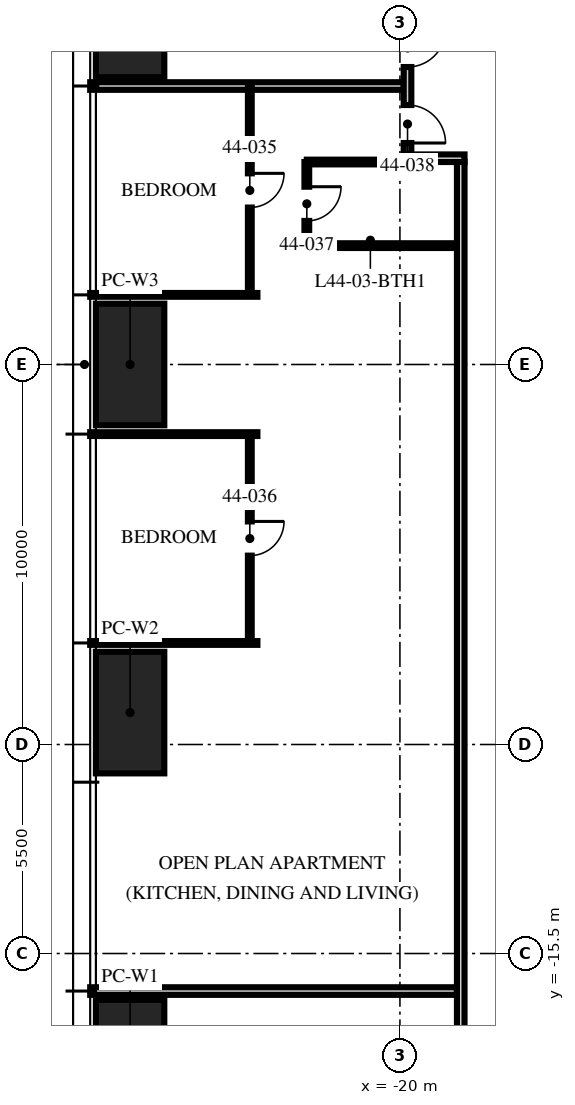
"""IFC4 building model, lengths in metres.
Left out: names, types, materials, properties, quantities, classifications, styles, units other than length and angle.
Written with IfcOpenShell. Run it as: python <this file> out.ifc"""

import sys

from ifc_helpers import new_model, si_unit, direction, frame, frame_2d, origin, origin_2d, place, context, subcontext, project, spatial, rectangle, hollow_rectangle, extrude, element, fill, save


model = new_model("IFC4")
c1 = context("Model", 3, precision=1e-05, world=origin(), true_north=direction((0.0, 1.0)))
c2 = subcontext(c1, "Body", "Model", "MODEL_VIEW")
j1 = project(units=[si_unit("LENGTHUNIT", "METRE"), si_unit("PLANEANGLEUNIT", "RADIAN")], contexts=[c1])
p1 = place(None, origin())
s1 = spatial("IfcSite", under=j1, at=p1, CompositionType="ELEMENT")
p2 = place(p1, origin())
s2 = spatial("IfcBuilding", under=s1, at=p2, CompositionType="ELEMENT")
p3 = place(p2, frame((0.0, 0.0, 174.75)))
s3 = spatial("IfcBuildingStorey", under=s2, at=p3, CompositionType="ELEMENT", Elevation=174.75)
for number, where, z_axis, x_axis in (
    (1, (-27.1, -18.32, 0.0), (0.0, 0.0, 1.0), (0.0, 1.0, 0.0)),
    (2, (-27.1, -9.16, 0.0), (0.0, 0.0, 1.0), (0.0, 1.0, 0.0)),
    (3, (-27.1, 0.0, 0.0), (0.0, 0.0, 1.0), (0.0, 1.0, 0.0)),
    (4, (-27.1, 9.16, 0.0), (0.0, 0.0, 1.0), (0.0, 1.0, 0.0)),
):
    element("IfcColumn", number, at=place(p3, frame(where, z_axis=z_axis, x_axis=x_axis)), inside=s3, PredefinedType="COLUMN", context=c2, shape_type="SweptSolid", body=[
        extrude(hollow_rectangle(XDim=3.2, YDim=1.8, WallThickness=0.2, at=origin_2d()), origin(), (0.0, 0.0, 1.0), 3.75),
    ])
p4 = place(p3, frame((-19.9, 7.328, 0.0), z_axis=(0.0, 0.0, 1.0), x_axis=(-1.0, 0.0, 0.0)))
e5 = element("IfcWall", 5, at=p4, inside=s3, PredefinedType="PARTITIONING", context=c2, shape_type="SweptSolid", body=[
    extrude(rectangle(XDim=8.25, YDim=0.2, at=frame_2d((4.125, 0.0))), origin(), (0.0, 0.0, 1.0), 2.81),
])
for number, where, z_axis, x_axis in (
    (6, (-23.75, 1.832, 0.0), (0.0, 0.0, 1.0), (-1.0, 0.0, 0.0)),
    (7, (-23.75, -1.832, 0.0), (0.0, 0.0, 1.0), (-1.0, 0.0, 0.0)),
    (8, (-23.75, -7.328, 0.0), (0.0, 0.0, 1.0), (-1.0, 0.0, 0.0)),
):
    element("IfcWall", number, at=place(p3, frame(where, z_axis=z_axis, x_axis=x_axis)), inside=s3, PredefinedType="PARTITIONING", context=c2, shape_type="SweptSolid", body=[
        extrude(rectangle(XDim=4.4, YDim=0.1, at=frame_2d((2.2, 0.0))), origin(), (0.0, 0.0, 1.0), 2.81),
    ])
p5 = place(p3, frame((-18.5, -16.488, 0.0), z_axis=(0.0, 0.0, 1.0), x_axis=(-1.0, 0.0, 0.0)))
e9 = element("IfcWall", 9, at=p5, inside=s3, PredefinedType="PARTITIONING", context=c2, shape_type="SweptSolid", body=[
    extrude(rectangle(XDim=9.65, YDim=0.2, at=frame_2d((4.825, 0.0))), origin(), (0.0, 0.0, 1.0), 2.81),
])
p6 = place(p3, frame((-23.95, 7.328, 0.0), z_axis=(0.0, 0.0, 1.0), x_axis=(0.0, -1.0, 0.0)))
e10 = element("IfcWall", 10, at=p6, inside=s3, PredefinedType="PARTITIONING", context=c2, shape_type="SweptSolid", body=[
    extrude(rectangle(XDim=5.496, YDim=0.1, at=frame_2d((2.748, 0.0))), origin(), (0.0, 0.0, 1.0), 2.81),
])
p7 = place(p6, frame((2.298, 0.0, 0.0)))
e11 = element("IfcOpeningElement", 11, at=p7, cuts=e10, PredefinedType="OPENING", context=c2, shape_type="SweptSolid", body=[
    extrude(rectangle(XDim=0.9, YDim=2.1, at=frame_2d((0.45, 1.05))), frame((0.0, 0.06, 0.0), z_axis=(0.0, -1.0, 0.0), x_axis=(1.0, 0.0, 0.0)), (0.0, 0.0, 1.0), 0.12),
])
p8 = place(p3, frame((-23.95, -1.832, 0.0), z_axis=(0.0, 0.0, 1.0), x_axis=(0.0, -1.0, 0.0)))
e12 = element("IfcWall", 12, at=p8, inside=s3, PredefinedType="PARTITIONING", context=c2, shape_type="SweptSolid", body=[
    extrude(rectangle(XDim=5.496, YDim=0.1, at=frame_2d((2.748, 0.0))), origin(), (0.0, 0.0, 1.0), 2.81),
])
p9 = place(p8, frame((2.298, 0.0, 0.0)))
e13 = element("IfcOpeningElement", 13, at=p9, cuts=e12, PredefinedType="OPENING", context=c2, shape_type="SweptSolid", body=[
    extrude(rectangle(XDim=0.9, YDim=2.1, at=frame_2d((0.45, 1.05))), frame((0.0, 0.06, 0.0), z_axis=(0.0, -1.0, 0.0), x_axis=(1.0, 0.0, 0.0)), (0.0, 0.0, 1.0), 0.12),
])
p10 = place(p3, frame((-22.45, 5.328, 0.0), z_axis=(0.0, 0.0, 1.0), x_axis=(0.0, -1.0, 0.0)))
e14 = element("IfcWall", 14, at=p10, inside=s3, PredefinedType="PARTITIONING", context=c2, shape_type="SweptSolid", body=[
    extrude(rectangle(XDim=2.2, YDim=0.125, at=frame_2d((1.1, 0.0))), origin(), (0.0, 0.0, 1.0), 2.81),
])
p11 = place(p10, frame((0.65, 0.0, 0.0)))
e15 = element("IfcOpeningElement", 15, at=p11, cuts=e14, PredefinedType="OPENING", context=c2, shape_type="SweptSolid", body=[
    extrude(rectangle(XDim=0.9, YDim=2.1, at=frame_2d((0.45, 1.05))), frame((0.0, 0.073, 0.0), z_axis=(0.0, -1.0, 0.0), x_axis=(1.0, 0.0, 0.0)), (0.0, 0.0, 1.0), 0.145),
])
p12 = place(p3, frame((-19.97, 5.328, 0.0), z_axis=(0.0, 0.0, 1.0), x_axis=(-1.0, 0.0, 0.0)))
e16 = element("IfcWall", 16, at=p12, inside=s3, PredefinedType="PARTITIONING", context=c2, shape_type="SweptSolid", body=[
    extrude(rectangle(XDim=2.48, YDim=0.125, at=frame_2d((1.24, 0.0))), origin(), (0.0, 0.0, 1.0), 3.5),
])
p13 = place(p3, frame((-18.5, 3.128, 0.0), z_axis=(0.0, 0.0, 1.0), x_axis=(-1.0, 0.0, 0.0)))
e17 = element("IfcWall", 17, at=p13, inside=s3, PredefinedType="PARTITIONING", context=c2, shape_type="SweptSolid", body=[
    extrude(rectangle(XDim=3.95, YDim=0.125, at=frame_2d((1.975, 0.0))), origin(), (0.0, 0.0, 1.0), 3.5),
])
p14 = place(p3, frame((-18.3, 5.428, 0.0), z_axis=(0.0, 0.0, 1.0), x_axis=(-1.0, 0.0, 0.0)))
e18 = element("IfcWall", 18, at=p14, inside=s3, PredefinedType="PARTITIONING", context=c2, shape_type="SweptSolid", body=[
    extrude(rectangle(XDim=1.6, YDim=0.2, at=frame_2d((0.8, 0.0))), origin(), (0.0, 0.0, 1.0), 3.5),
])
p15 = place(p3, frame((-19.8, 9.128, 0.0), z_axis=(0.0, 0.0, 1.0), x_axis=(0.0, -1.0, 0.0)))
e19 = element("IfcWall", 19, at=p15, inside=s3, PredefinedType="PARTITIONING", context=c2, shape_type="SweptSolid", body=[
    extrude(rectangle(XDim=3.6, YDim=0.2, at=frame_2d((1.8, 0.0))), origin(), (0.0, 0.0, 1.0), 2.7),
])
p16 = place(p15, frame((0.3, 0.0, 0.0)))
e20 = element("IfcOpeningElement", 20, at=p16, cuts=e19, PredefinedType="OPENING", context=c2, shape_type="SweptSolid", body=[
    extrude(rectangle(XDim=1.0, YDim=2.2, at=frame_2d((0.5, 1.1))), frame((0.0, 0.11, 0.0), z_axis=(0.0, -1.0, 0.0), x_axis=(1.0, 0.0, 0.0)), (0.0, 0.0, 1.0), 0.22),
])
p17 = place(p15, frame((2.3, 0.0, 0.0)))
e21 = element("IfcOpeningElement", 21, at=p17, cuts=e19, PredefinedType="OPENING", context=c2, shape_type="SweptSolid", body=[
    extrude(rectangle(XDim=1.0, YDim=2.2, at=frame_2d((0.5, 1.1))), frame((0.0, 0.11, 0.0), z_axis=(0.0, -1.0, 0.0), x_axis=(1.0, 0.0, 0.0)), (0.0, 0.0, 1.0), 0.22),
])
p18 = place(p3, frame((-18.4, 5.328, 0.0), z_axis=(0.0, 0.0, 1.0), x_axis=(0.0, -1.0, 0.0)))
e22 = element("IfcWall", 22, at=p18, inside=s3, PredefinedType="PARTITIONING", context=c2, shape_type="SweptSolid", body=[
    extrude(rectangle(XDim=23.628, YDim=0.2, at=frame_2d((11.814, 0.0))), origin(), (0.0, 0.0, 1.0), 2.3),
])
p19 = place(p16, origin())
e23 = element("IfcDoor", 23, at=p19, inside=s3, OperationType="SINGLE_SWING_LEFT", PredefinedType="DOOR", context=c2, shape_type="SweptSolid", body=[
    extrude(rectangle(XDim=1.0, YDim=2.2, at=frame_2d((0.5, 1.1))), frame((0.0, 0.025, 0.0), z_axis=(0.0, -1.0, 0.0), x_axis=(1.0, 0.0, 0.0)), (0.0, 0.0, 1.0), 0.05),
])
fill(e20, e23)
p20 = place(p7, origin())
e24 = element("IfcDoor", 24, at=p20, inside=s3, OperationType="SINGLE_SWING_LEFT", PredefinedType="DOOR", context=c2, shape_type="SweptSolid", body=[
    extrude(rectangle(XDim=0.9, YDim=2.1, at=frame_2d((0.45, 1.05))), frame((0.0, 0.025, 0.0), z_axis=(0.0, -1.0, 0.0), x_axis=(1.0, 0.0, 0.0)), (0.0, 0.0, 1.0), 0.05),
])
fill(e11, e24)
p21 = place(p9, origin())
e25 = element("IfcDoor", 25, at=p21, inside=s3, OperationType="SINGLE_SWING_LEFT", PredefinedType="DOOR", context=c2, shape_type="SweptSolid", body=[
    extrude(rectangle(XDim=0.9, YDim=2.1, at=frame_2d((0.45, 1.05))), frame((0.0, 0.025, 0.0), z_axis=(0.0, -1.0, 0.0), x_axis=(1.0, 0.0, 0.0)), (0.0, 0.0, 1.0), 0.05),
])
fill(e13, e25)
p22 = place(p11, origin())
e26 = element("IfcDoor", 26, at=p22, inside=s3, OperationType="SINGLE_SWING_LEFT", PredefinedType="DOOR", context=c2, shape_type="SweptSolid", body=[
    extrude(rectangle(XDim=0.9, YDim=2.1, at=frame_2d((0.45, 1.05))), frame((0.0, 0.025, 0.0), z_axis=(0.0, -1.0, 0.0), x_axis=(1.0, 0.0, 0.0)), (0.0, 0.0, 1.0), 0.05),
])
fill(e15, e26)
p23 = place(p17, origin())
e27 = element("IfcDoor", 27, at=p23, inside=s3, OperationType="SINGLE_SWING_RIGHT", PredefinedType="DOOR", context=c2, shape_type="SweptSolid", body=[
    extrude(rectangle(XDim=1.0, YDim=2.2, at=frame_2d((0.5, 1.1))), frame((0.0, 0.025, 0.0), z_axis=(0.0, -1.0, 0.0), x_axis=(1.0, 0.0, 0.0)), (0.0, 0.0, 1.0), 0.05),
])
fill(e21, e27)
save(model, sys.argv[1])
